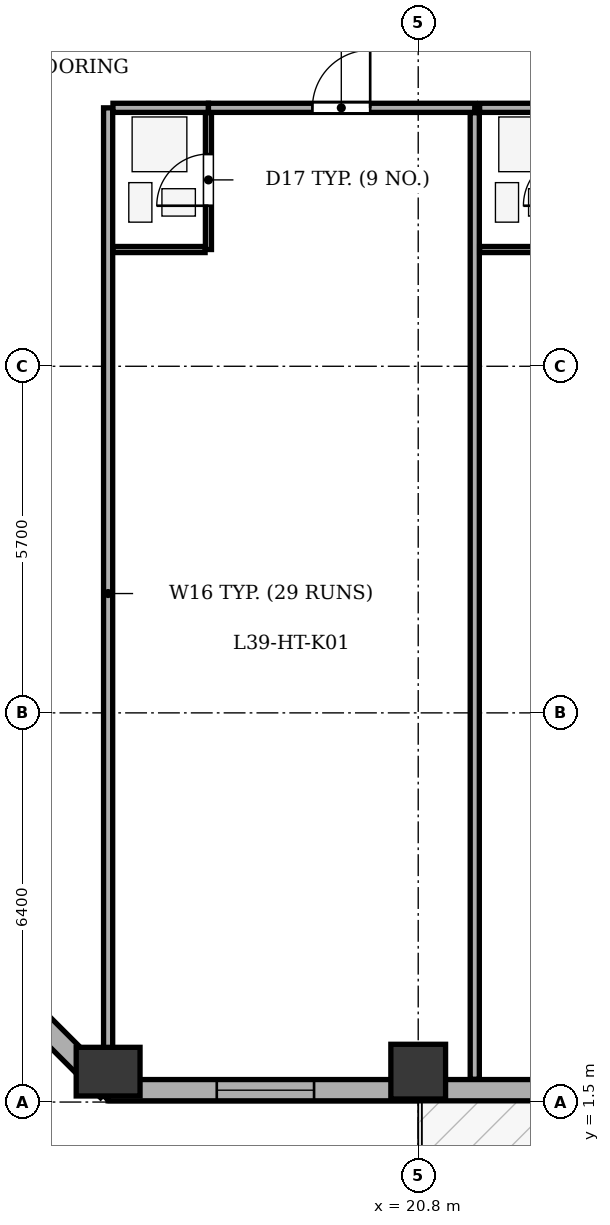
"""IFC4 building model, lengths in metres.
Left out: names, types, materials, properties, quantities, classifications, styles, units other than length and angle.
Written with IfcOpenShell. Run it as: python <this file> out.ifc"""

import sys

from ifc_helpers import new_model, si_unit, direction, frame, frame_2d, origin, origin_2d, place, context, subcontext, project, spatial, rectangle, extrude, element, fill, save


model = new_model("IFC4")
c1 = context("Model", 3, precision=1e-05, world=origin(), true_north=direction((0.0, 1.0)))
c2 = subcontext(c1, "Body", "Model", "MODEL_VIEW")
j1 = project(units=[si_unit("LENGTHUNIT", "METRE"), si_unit("PLANEANGLEUNIT", "RADIAN")], contexts=[c1])
p1 = place(None, origin())
s1 = spatial("IfcSite", under=j1, at=p1, CompositionType="ELEMENT")
p2 = place(p1, origin())
s2 = spatial("IfcBuilding", under=s1, at=p2, CompositionType="ELEMENT")
p3 = place(p2, frame((0.0, 0.0, 155.3)))
s3 = spatial("IfcBuildingStorey", under=s2, at=p3, CompositionType="ELEMENT", Elevation=155.3)
p4 = place(p3, frame((15.7, 2.0, 0.0), z_axis=(0.0, 0.0, 1.0), x_axis=(1.0, 0.0, 0.0)))
e1 = element("IfcColumn", 1, at=p4, inside=s3, PredefinedType="COLUMN", context=c2, shape_type="SweptSolid", body=[
    extrude(rectangle(XDim=0.8, YDim=1.05, at=origin_2d()), origin(), (0.0, 0.0, 1.0), 3.5),
])
p5 = place(p3, frame((20.8, 2.0, 0.0), z_axis=(0.0, 0.0, 1.0), x_axis=(1.0, 0.0, 0.0)))
e2 = element("IfcColumn", 2, at=p5, inside=s3, PredefinedType="COLUMN", context=c2, shape_type="SweptSolid", body=[
    extrude(rectangle(XDim=0.9, YDim=0.9, at=origin_2d()), origin(), (0.0, 0.0, 1.0), 3.5),
])
p6 = place(p3, frame((50.7, 1.695, 0.0), z_axis=(0.0, 0.0, 1.0), x_axis=(-1.0, 0.0, 0.0)))
e3 = element("IfcWall", 3, at=p6, inside=s3, PredefinedType="STANDARD", context=c2, shape_type="SweptSolid", body=[
    extrude(rectangle(XDim=35.0, YDim=0.35, at=frame_2d((17.5, 0.0))), origin(), (0.0, 0.0, 1.0), 2.785),
])
p7 = place(p6, frame((26.0, 0.0, 0.0)))
e4 = element("IfcOpeningElement", 4, at=p7, cuts=e3, PredefinedType="OPENING", context=c2, shape_type="SweptSolid", body=[
    extrude(rectangle(XDim=1.0, YDim=2.02, at=frame_2d((0.5, 1.01))), frame((0.0, 0.185, 0.0), z_axis=(0.0, -1.0, 0.0), x_axis=(1.0, 0.0, 0.0)), (0.0, 0.0, 1.0), 0.37),
])
p8 = place(p6, frame((1.763, 0.0, 0.75)))
e5 = element("IfcOpeningElement", 5, at=p8, cuts=e3, PredefinedType="OPENING", context=c2, shape_type="SweptSolid", body=[
    extrude(rectangle(XDim=1.6, YDim=1.75, at=frame_2d((0.8, 0.875))), frame((0.0, 0.185, 0.0), z_axis=(0.0, -1.0, 0.0), x_axis=(1.0, 0.0, 0.0)), (0.0, 0.0, 1.0), 0.37),
])
p9 = place(p6, frame((6.764, 0.0, 0.75)))
e6 = element("IfcOpeningElement", 6, at=p9, cuts=e3, PredefinedType="OPENING", context=c2, shape_type="SweptSolid", body=[
    extrude(rectangle(XDim=1.6, YDim=1.75, at=frame_2d((0.8, 0.875))), frame((0.0, 0.185, 0.0), z_axis=(0.0, -1.0, 0.0), x_axis=(1.0, 0.0, 0.0)), (0.0, 0.0, 1.0), 0.37),
])
p10 = place(p6, frame((11.989, 0.0, 0.75)))
e7 = element("IfcOpeningElement", 7, at=p10, cuts=e3, PredefinedType="OPENING", context=c2, shape_type="SweptSolid", body=[
    extrude(rectangle(XDim=1.6, YDim=1.75, at=frame_2d((0.8, 0.875))), frame((0.0, 0.185, 0.0), z_axis=(0.0, -1.0, 0.0), x_axis=(1.0, 0.0, 0.0)), (0.0, 0.0, 1.0), 0.37),
])
p11 = place(p6, frame((18.604, 0.0, 0.75)))
e8 = element("IfcOpeningElement", 8, at=p11, cuts=e3, PredefinedType="OPENING", context=c2, shape_type="SweptSolid", body=[
    extrude(rectangle(XDim=1.6, YDim=1.75, at=frame_2d((0.8, 0.875))), frame((0.0, 0.185, 0.0), z_axis=(0.0, -1.0, 0.0), x_axis=(1.0, 0.0, 0.0)), (0.0, 0.0, 1.0), 0.37),
])
p12 = place(p6, frame((31.613, 0.0, 0.75)))
e9 = element("IfcOpeningElement", 9, at=p12, cuts=e3, PredefinedType="OPENING", context=c2, shape_type="SweptSolid", body=[
    extrude(rectangle(XDim=1.6, YDim=1.75, at=frame_2d((0.8, 0.875))), frame((0.0, 0.185, 0.0), z_axis=(0.0, -1.0, 0.0), x_axis=(1.0, 0.0, 0.0)), (0.0, 0.0, 1.0), 0.37),
])
p13 = place(p3, frame((15.7, 1.695, 0.0), z_axis=(0.0, 0.0, 1.0), x_axis=(-0.707106781187, 0.707106781187, 0.0)))
e10 = element("IfcWall", 10, at=p13, inside=s3, PredefinedType="STANDARD", context=c2, shape_type="SweptSolid", body=[
    extrude(rectangle(XDim=6.795, YDim=0.35, at=frame_2d((3.397, 0.0))), origin(), (0.0, 0.0, 1.0), 2.785),
])
p14 = place(p13, frame((2.698, 0.0, 0.75)))
e11 = element("IfcOpeningElement", 11, at=p14, cuts=e10, PredefinedType="OPENING", context=c2, shape_type="SweptSolid", body=[
    extrude(rectangle(XDim=1.4, YDim=1.65, at=frame_2d((0.7, 0.825))), frame((0.0, 0.185, 0.0), z_axis=(0.0, -1.0, 0.0), x_axis=(1.0, 0.0, 0.0)), (0.0, 0.0, 1.0), 0.37),
])
p15 = place(p3, frame((15.7, 1.875, 0.0), z_axis=(0.0, 0.0, 1.0), x_axis=(0.0, 1.0, 0.0)))
e12 = element("IfcWall", 12, at=p15, inside=s3, PredefinedType="PARTITIONING", context=c2, shape_type="SweptSolid", body=[
    extrude(rectangle(XDim=15.975, YDim=0.15, at=frame_2d((7.988, 0.0))), origin(), (0.0, 0.0, 1.0), 3.2),
])
p16 = place(p3, frame((15.78, 17.85, 0.0), z_axis=(0.0, 0.0, 1.0), x_axis=(1.0, 0.0, 0.0)))
e13 = element("IfcWall", 13, at=p16, inside=s3, PredefinedType="PARTITIONING", context=c2, shape_type="SweptSolid", body=[
    extrude(rectangle(XDim=1.57, YDim=0.15, at=frame_2d((0.785, 0.0))), origin(), (0.0, 0.0, 1.0), 3.2),
])
p17 = place(p3, frame((17.35, 17.85, 0.0), z_axis=(0.0, 0.0, 1.0), x_axis=(1.0, 0.0, 0.0)))
e14 = element("IfcWall", 14, at=p17, inside=s3, PredefinedType="PARTITIONING", context=c2, shape_type="SweptSolid", body=[
    extrude(rectangle(XDim=4.38, YDim=0.15, at=frame_2d((2.19, 0.0))), origin(), (0.0, 0.0, 1.0), 3.2),
])
p18 = place(p17, frame((1.71, 0.0, 0.0)))
e15 = element("IfcOpeningElement", 15, at=p18, cuts=e14, PredefinedType="OPENING", context=c2, shape_type="SweptSolid", body=[
    extrude(rectangle(XDim=0.95, YDim=2.1, at=frame_2d((0.475, 1.05))), frame((0.0, 0.085, 0.0), z_axis=(0.0, -1.0, 0.0), x_axis=(1.0, 0.0, 0.0)), (0.0, 0.0, 1.0), 0.17),
])
p19 = place(p3, frame((17.35, 15.52, 0.0), z_axis=(0.0, 0.0, 1.0), x_axis=(0.0, 1.0, 0.0)))
e16 = element("IfcWall", 16, at=p19, inside=s3, PredefinedType="PARTITIONING", context=c2, shape_type="SweptSolid", body=[
    extrude(rectangle(XDim=2.25, YDim=0.1, at=frame_2d((1.125, 0.0))), origin(), (0.0, 0.0, 1.0), 3.2),
])
p20 = place(p19, frame((0.72, 0.0, 0.0)))
e17 = element("IfcOpeningElement", 17, at=p20, cuts=e16, PredefinedType="OPENING", context=c2, shape_type="SweptSolid", body=[
    extrude(rectangle(XDim=0.85, YDim=2.05, at=frame_2d((0.425, 1.025))), frame((0.0, 0.06, 0.0), z_axis=(0.0, -1.0, 0.0), x_axis=(1.0, 0.0, 0.0)), (0.0, 0.0, 1.0), 0.12),
])
p21 = place(p3, frame((15.78, 15.52, 0.0), z_axis=(0.0, 0.0, 1.0), x_axis=(1.0, 0.0, 0.0)))
e18 = element("IfcWall", 18, at=p21, inside=s3, PredefinedType="PARTITIONING", context=c2, shape_type="SweptSolid", body=[
    extrude(rectangle(XDim=1.515, YDim=0.1, at=frame_2d((0.757, 0.0))), origin(), (0.0, 0.0, 1.0), 3.2),
])
p22 = place(p3, frame((21.73, 1.875, 0.0), z_axis=(0.0, 0.0, 1.0), x_axis=(0.0, 1.0, 0.0)))
e19 = element("IfcWall", 19, at=p22, inside=s3, PredefinedType="PARTITIONING", context=c2, shape_type="SweptSolid", body=[
    extrude(rectangle(XDim=15.895, YDim=0.15, at=frame_2d((7.948, 0.0))), origin(), (0.0, 0.0, 1.0), 3.2),
])
p23 = place(p3, frame((21.81, 17.85, 0.0), z_axis=(0.0, 0.0, 1.0), x_axis=(1.0, 0.0, 0.0)))
e20 = element("IfcWall", 20, at=p23, inside=s3, PredefinedType="PARTITIONING", context=c2, shape_type="SweptSolid", body=[
    extrude(rectangle(XDim=1.57, YDim=0.15, at=frame_2d((0.785, 0.0))), origin(), (0.0, 0.0, 1.0), 3.2),
])
p24 = place(p3, frame((21.81, 15.52, 0.0), z_axis=(0.0, 0.0, 1.0), x_axis=(1.0, 0.0, 0.0)))
e21 = element("IfcWall", 21, at=p24, inside=s3, PredefinedType="PARTITIONING", context=c2, shape_type="SweptSolid", body=[
    extrude(rectangle(XDim=1.515, YDim=0.1, at=frame_2d((0.757, 0.0))), origin(), (0.0, 0.0, 1.0), 3.2),
])
p25 = place(p12, origin())
e22 = element("IfcWindow", 22, at=p25, inside=s3, PartitioningType="SINGLE_PANEL", PredefinedType="WINDOW", context=c2, shape_type="SweptSolid", body=[
    extrude(rectangle(XDim=1.6, YDim=1.75, at=frame_2d((0.8, 0.875))), frame((0.0, -0.01, 0.0), z_axis=(0.0, -1.0, 0.0), x_axis=(1.0, 0.0, 0.0)), (0.0, 0.0, 1.0), 0.06),
])
fill(e9, e22)
p26 = place(p20, origin())
e23 = element("IfcDoor", 23, at=p26, inside=s3, OperationType="SINGLE_SWING_LEFT", PredefinedType="DOOR", context=c2, shape_type="SweptSolid", body=[
    extrude(rectangle(XDim=0.85, YDim=2.05, at=frame_2d((0.425, 1.025))), frame((0.0, 0.025, 0.0), z_axis=(0.0, -1.0, 0.0), x_axis=(1.0, 0.0, 0.0)), (0.0, 0.0, 1.0), 0.05),
])
fill(e17, e23)
p27 = place(p18, origin())
e24 = element("IfcDoor", 24, at=p27, inside=s3, OperationType="SINGLE_SWING_RIGHT", PredefinedType="DOOR", context=c2, shape_type="SweptSolid", body=[
    extrude(rectangle(XDim=0.95, YDim=2.1, at=frame_2d((0.475, 1.05))), frame((0.0, 0.025, 0.0), z_axis=(0.0, -1.0, 0.0), x_axis=(1.0, 0.0, 0.0)), (0.0, 0.0, 1.0), 0.05),
])
fill(e15, e24)
save(model, sys.argv[1])
